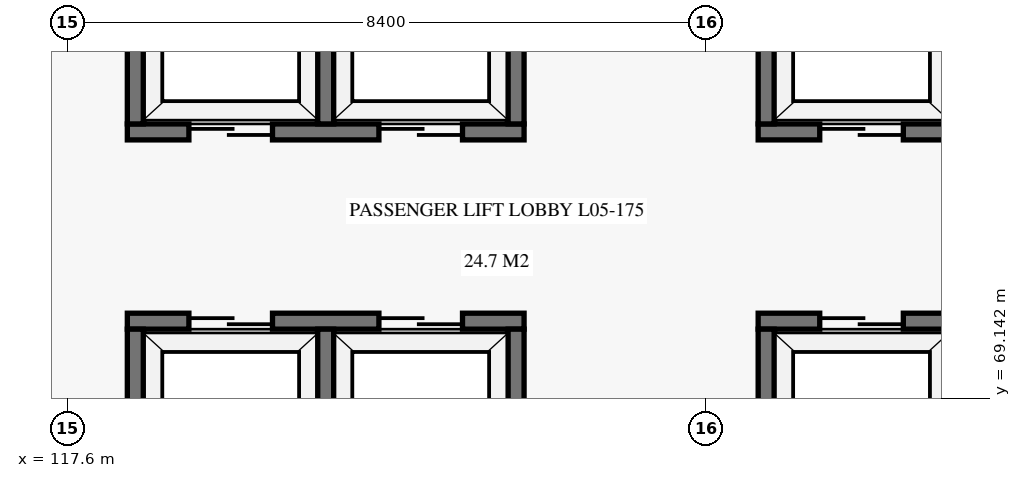
"""IFC4 building model, lengths in metres.
Left out: names, types, materials, properties, quantities, classifications, styles, units other than length and angle.
Written with IfcOpenShell. Run it as: python <this file> out.ifc"""

import sys

from ifc_helpers import new_model, si_unit, direction, frame, frame_2d, origin, place, context, subcontext, project, spatial, rectangle, extrude, element, fill, save


model = new_model("IFC4")
c1 = context("Model", 3, precision=1e-05, world=origin(), true_north=direction((0.0, 1.0)))
c2 = subcontext(c1, "Body", "Model", "MODEL_VIEW")
j1 = project(units=[si_unit("LENGTHUNIT", "METRE"), si_unit("PLANEANGLEUNIT", "RADIAN")], contexts=[c1])
p1 = place(None, origin())
s1 = spatial("IfcSite", under=j1, at=p1, CompositionType="ELEMENT")
p2 = place(p1, origin())
s2 = spatial("IfcBuilding", under=s1, at=p2, CompositionType="ELEMENT")
p3 = place(p2, frame((0.0, 0.0, 22.2)))
s3 = spatial("IfcBuildingStorey", under=s2, at=p3, CompositionType="ELEMENT", Elevation=22.2)
p4 = place(p3, frame((126.69, 70.155, 0.0), z_axis=(0.0, 0.0, 1.0), x_axis=(1.0, 0.0, 0.0)))
e1 = element("IfcWall", 1, at=p4, inside=s3, PredefinedType="SHEAR", context=c2, shape_type="SweptSolid", body=[
    extrude(rectangle(XDim=5.22, YDim=0.21, at=frame_2d((2.61, 0.0))), origin(), (0.0, 0.0, 1.0), 4.22),
])
p5 = place(p4, frame((0.81, 0.0, 0.0)))
e2 = element("IfcOpeningElement", 2, at=p5, cuts=e1, PredefinedType="OPENING", context=c2, shape_type="SweptSolid", body=[
    extrude(rectangle(XDim=1.1, YDim=2.15, at=frame_2d((0.55, 1.075))), frame((0.0, 0.115, 0.0), z_axis=(0.0, -1.0, 0.0), x_axis=(1.0, 0.0, 0.0)), (0.0, 0.0, 1.0), 0.23),
])
p6 = place(p4, frame((3.31, 0.0, 0.0)))
e3 = element("IfcOpeningElement", 3, at=p6, cuts=e1, PredefinedType="OPENING", context=c2, shape_type="SweptSolid", body=[
    extrude(rectangle(XDim=1.1, YDim=2.15, at=frame_2d((0.55, 1.075))), frame((0.0, 0.115, 0.0), z_axis=(0.0, -1.0, 0.0), x_axis=(1.0, 0.0, 0.0)), (0.0, 0.0, 1.0), 0.23),
])
p7 = place(p3, frame((126.795, 67.85, 0.0), z_axis=(0.0, 0.0, 1.0), x_axis=(0.0, 1.0, 0.0)))
e4 = element("IfcWall", 4, at=p7, inside=s3, PredefinedType="SHEAR", context=c2, shape_type="SweptSolid", body=[
    extrude(rectangle(XDim=2.2, YDim=0.21, at=frame_2d((1.1, 0.0))), origin(), (0.0, 0.0, 1.0), 4.22),
])
p8 = place(p3, frame((126.69, 72.645, 0.0), z_axis=(0.0, 0.0, 1.0), x_axis=(1.0, 0.0, 0.0)))
e5 = element("IfcWall", 5, at=p8, inside=s3, PredefinedType="SHEAR", context=c2, shape_type="SweptSolid", body=[
    extrude(rectangle(XDim=5.22, YDim=0.21, at=frame_2d((2.61, 0.0))), origin(), (0.0, 0.0, 1.0), 4.22),
])
p9 = place(p8, frame((0.81, 0.0, 0.0)))
e6 = element("IfcOpeningElement", 6, at=p9, cuts=e5, PredefinedType="OPENING", context=c2, shape_type="SweptSolid", body=[
    extrude(rectangle(XDim=1.1, YDim=2.15, at=frame_2d((0.55, 1.075))), frame((0.0, 0.115, 0.0), z_axis=(0.0, -1.0, 0.0), x_axis=(1.0, 0.0, 0.0)), (0.0, 0.0, 1.0), 0.23),
])
p10 = place(p8, frame((3.31, 0.0, 0.0)))
e7 = element("IfcOpeningElement", 7, at=p10, cuts=e5, PredefinedType="OPENING", context=c2, shape_type="SweptSolid", body=[
    extrude(rectangle(XDim=1.1, YDim=2.15, at=frame_2d((0.55, 1.075))), frame((0.0, 0.115, 0.0), z_axis=(0.0, -1.0, 0.0), x_axis=(1.0, 0.0, 0.0)), (0.0, 0.0, 1.0), 0.23),
])
p11 = place(p3, frame((126.795, 72.75, 0.0), z_axis=(0.0, 0.0, 1.0), x_axis=(0.0, 1.0, 0.0)))
e8 = element("IfcWall", 8, at=p11, inside=s3, PredefinedType="SHEAR", context=c2, shape_type="SweptSolid", body=[
    extrude(rectangle(XDim=2.2, YDim=0.21, at=frame_2d((1.1, 0.0))), origin(), (0.0, 0.0, 1.0), 4.22),
])
p12 = place(p3, frame((118.39, 70.155, 0.0), z_axis=(0.0, 0.0, 1.0), x_axis=(1.0, 0.0, 0.0)))
e9 = element("IfcWall", 9, at=p12, inside=s3, PredefinedType="SHEAR", context=c2, shape_type="SweptSolid", body=[
    extrude(rectangle(XDim=5.22, YDim=0.21, at=frame_2d((2.61, 0.0))), origin(), (0.0, 0.0, 1.0), 4.22),
])
p13 = place(p12, frame((0.81, 0.0, 0.0)))
e10 = element("IfcOpeningElement", 10, at=p13, cuts=e9, PredefinedType="OPENING", context=c2, shape_type="SweptSolid", body=[
    extrude(rectangle(XDim=1.1, YDim=2.15, at=frame_2d((0.55, 1.075))), frame((0.0, 0.115, 0.0), z_axis=(0.0, -1.0, 0.0), x_axis=(1.0, 0.0, 0.0)), (0.0, 0.0, 1.0), 0.23),
])
p14 = place(p12, frame((3.31, 0.0, 0.0)))
e11 = element("IfcOpeningElement", 11, at=p14, cuts=e9, PredefinedType="OPENING", context=c2, shape_type="SweptSolid", body=[
    extrude(rectangle(XDim=1.1, YDim=2.15, at=frame_2d((0.55, 1.075))), frame((0.0, 0.115, 0.0), z_axis=(0.0, -1.0, 0.0), x_axis=(1.0, 0.0, 0.0)), (0.0, 0.0, 1.0), 0.23),
])
for number, where, z_axis, x_axis in (
    (12, (118.495, 67.85, 0.0), (0.0, 0.0, 1.0), (0.0, 1.0, 0.0)),
    (13, (123.505, 67.85, 0.0), (0.0, 0.0, 1.0), (0.0, 1.0, 0.0)),
    (14, (121.0, 67.85, 0.0), (0.0, 0.0, 1.0), (0.0, 1.0, 0.0)),
):
    element("IfcWall", number, at=place(p3, frame(where, z_axis=z_axis, x_axis=x_axis)), inside=s3, PredefinedType="SHEAR", context=c2, shape_type="SweptSolid", body=[
        extrude(rectangle(XDim=2.2, YDim=0.21, at=frame_2d((1.1, 0.0))), origin(), (0.0, 0.0, 1.0), 4.22),
    ])
p15 = place(p3, frame((118.39, 72.645, 0.0), z_axis=(0.0, 0.0, 1.0), x_axis=(1.0, 0.0, 0.0)))
e15 = element("IfcWall", 15, at=p15, inside=s3, PredefinedType="SHEAR", context=c2, shape_type="SweptSolid", body=[
    extrude(rectangle(XDim=5.22, YDim=0.21, at=frame_2d((2.61, 0.0))), origin(), (0.0, 0.0, 1.0), 4.22),
])
p16 = place(p15, frame((0.81, 0.0, 0.0)))
e16 = element("IfcOpeningElement", 16, at=p16, cuts=e15, PredefinedType="OPENING", context=c2, shape_type="SweptSolid", body=[
    extrude(rectangle(XDim=1.1, YDim=2.15, at=frame_2d((0.55, 1.075))), frame((0.0, 0.115, 0.0), z_axis=(0.0, -1.0, 0.0), x_axis=(1.0, 0.0, 0.0)), (0.0, 0.0, 1.0), 0.23),
])
p17 = place(p15, frame((3.31, 0.0, 0.0)))
e17 = element("IfcOpeningElement", 17, at=p17, cuts=e15, PredefinedType="OPENING", context=c2, shape_type="SweptSolid", body=[
    extrude(rectangle(XDim=1.1, YDim=2.15, at=frame_2d((0.55, 1.075))), frame((0.0, 0.115, 0.0), z_axis=(0.0, -1.0, 0.0), x_axis=(1.0, 0.0, 0.0)), (0.0, 0.0, 1.0), 0.23),
])
for number, where, z_axis, x_axis in (
    (18, (118.495, 72.75, 0.0), (0.0, 0.0, 1.0), (0.0, 1.0, 0.0)),
    (19, (123.505, 72.75, 0.0), (0.0, 0.0, 1.0), (0.0, 1.0, 0.0)),
    (20, (121.0, 72.75, 0.0), (0.0, 0.0, 1.0), (0.0, 1.0, 0.0)),
):
    element("IfcWall", number, at=place(p3, frame(where, z_axis=z_axis, x_axis=x_axis)), inside=s3, PredefinedType="SHEAR", context=c2, shape_type="SweptSolid", body=[
        extrude(rectangle(XDim=2.2, YDim=0.21, at=frame_2d((1.1, 0.0))), origin(), (0.0, 0.0, 1.0), 4.22),
    ])
p18 = place(p5, origin())
e21 = element("IfcDoor", 21, at=p18, inside=s3, OperationType="DOUBLE_DOOR_SLIDING", PredefinedType="DOOR", context=c2, shape_type="SweptSolid", body=[
    extrude(rectangle(XDim=1.1, YDim=2.15, at=frame_2d((0.55, 1.075))), frame((0.0, 0.025, 0.0), z_axis=(0.0, -1.0, 0.0), x_axis=(1.0, 0.0, 0.0)), (0.0, 0.0, 1.0), 0.05),
])
fill(e2, e21)
p19 = place(p9, origin())
e22 = element("IfcDoor", 22, at=p19, inside=s3, OperationType="DOUBLE_DOOR_SLIDING", PredefinedType="DOOR", context=c2, shape_type="SweptSolid", body=[
    extrude(rectangle(XDim=1.1, YDim=2.15, at=frame_2d((0.55, 1.075))), frame((0.0, 0.025, 0.0), z_axis=(0.0, -1.0, 0.0), x_axis=(1.0, 0.0, 0.0)), (0.0, 0.0, 1.0), 0.05),
])
fill(e6, e22)
p20 = place(p13, origin())
e23 = element("IfcDoor", 23, at=p20, inside=s3, OperationType="DOUBLE_DOOR_SLIDING", PredefinedType="DOOR", context=c2, shape_type="SweptSolid", body=[
    extrude(rectangle(XDim=1.1, YDim=2.15, at=frame_2d((0.55, 1.075))), frame((0.0, 0.025, 0.0), z_axis=(0.0, -1.0, 0.0), x_axis=(1.0, 0.0, 0.0)), (0.0, 0.0, 1.0), 0.05),
])
fill(e10, e23)
p21 = place(p14, origin())
e24 = element("IfcDoor", 24, at=p21, inside=s3, OperationType="DOUBLE_DOOR_SLIDING", PredefinedType="DOOR", context=c2, shape_type="SweptSolid", body=[
    extrude(rectangle(XDim=1.1, YDim=2.15, at=frame_2d((0.55, 1.075))), frame((0.0, 0.025, 0.0), z_axis=(0.0, -1.0, 0.0), x_axis=(1.0, 0.0, 0.0)), (0.0, 0.0, 1.0), 0.05),
])
fill(e11, e24)
p22 = place(p16, origin())
e25 = element("IfcDoor", 25, at=p22, inside=s3, OperationType="DOUBLE_DOOR_SLIDING", PredefinedType="DOOR", context=c2, shape_type="SweptSolid", body=[
    extrude(rectangle(XDim=1.1, YDim=2.15, at=frame_2d((0.55, 1.075))), frame((0.0, 0.025, 0.0), z_axis=(0.0, -1.0, 0.0), x_axis=(1.0, 0.0, 0.0)), (0.0, 0.0, 1.0), 0.05),
])
fill(e16, e25)
p23 = place(p17, origin())
e26 = element("IfcDoor", 26, at=p23, inside=s3, OperationType="DOUBLE_DOOR_SLIDING", PredefinedType="DOOR", context=c2, shape_type="SweptSolid", body=[
    extrude(rectangle(XDim=1.1, YDim=2.15, at=frame_2d((0.55, 1.075))), frame((0.0, 0.025, 0.0), z_axis=(0.0, -1.0, 0.0), x_axis=(1.0, 0.0, 0.0)), (0.0, 0.0, 1.0), 0.05),
])
fill(e17, e26)
save(model, sys.argv[1])
